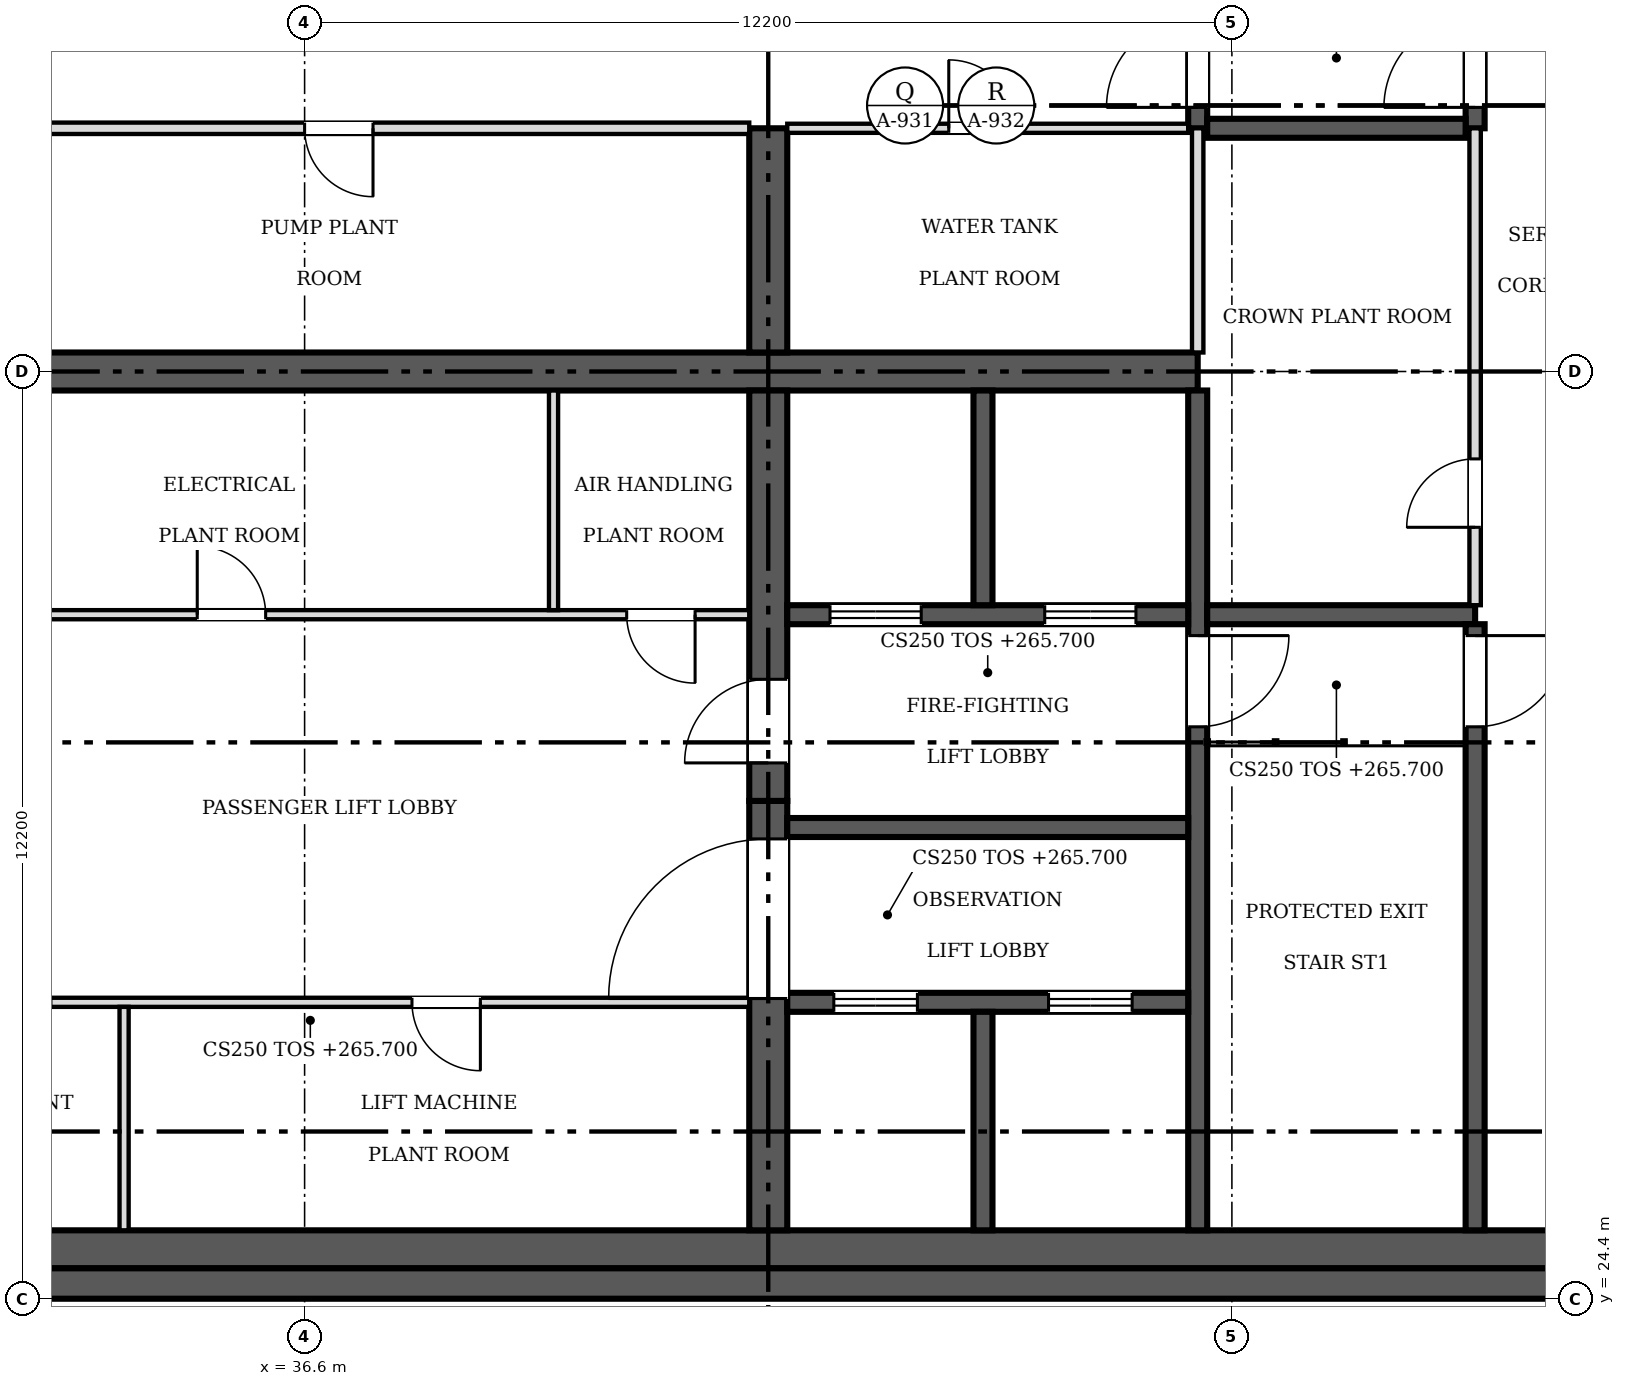
"""IFC4 building model, lengths in metres.
Left out: names, types, materials, properties, quantities, classifications, styles, units other than length and angle.
Written with IfcOpenShell. Run it as: python <this file> out.ifc"""

import sys

from ifc_helpers import new_model, si_unit, direction, frame, frame_2d, origin, place, context, subcontext, project, spatial, rectangle, extrude, source, transform, mapped, element, fill, save


model = new_model("IFC4")
c1 = context("Model", 3, precision=1e-05, world=origin(), true_north=direction((0.0, 1.0)))
c2 = subcontext(c1, "Body", "Model", "MODEL_VIEW")
j1 = project(units=[si_unit("LENGTHUNIT", "METRE"), si_unit("PLANEANGLEUNIT", "RADIAN")], contexts=[c1])
p1 = place(None, origin())
s1 = spatial("IfcSite", under=j1, at=p1, CompositionType="ELEMENT")
p2 = place(p1, origin())
s2 = spatial("IfcBuilding", under=s1, at=p2, CompositionType="ELEMENT")
p3 = place(p2, frame((0.0, 0.0, 265.7)))
s3 = spatial("IfcBuildingStorey", under=s2, at=p3, CompositionType="ELEMENT", Elevation=265.7)
p4 = place(p3, frame((54.9, 24.6, 0.0), z_axis=(0.0, 0.0, 1.0), x_axis=(-1.0, 0.0, 0.0)))
e1 = element("IfcWall", 1, at=p4, inside=s3, PredefinedType="SHEAR", context=c2, shape_type="SweptSolid", body=[
    extrude(rectangle(XDim=24.4, YDim=0.4, at=frame_2d((12.2, 0.0))), origin(), (0.0, 0.0, 1.0), 4.2),
])
p5 = place(p3, frame((30.9, 25.05, 0.0), z_axis=(0.0, 0.0, 1.0), x_axis=(1.0, 0.0, 0.0)))
e2 = element("IfcWall", 2, at=p5, inside=s3, PredefinedType="SOLIDWALL", context=c2, shape_type="SweptSolid", body=[
    extrude(rectangle(XDim=23.6, YDim=0.5, at=frame_2d((11.8, 0.0))), origin(), (0.0, 0.0, 1.0), 4.2),
])
p6 = place(p3, frame((31.4, 36.6, 0.0), z_axis=(0.0, 0.0, 1.0), x_axis=(1.0, 0.0, 0.0)))
e3 = element("IfcWall", 3, at=p6, inside=s3, PredefinedType="SHEAR", context=c2, shape_type="SweptSolid", body=[
    extrude(rectangle(XDim=16.95, YDim=0.5, at=frame_2d((8.475, 0.0))), origin(), (0.0, 0.0, 1.0), 4.2),
])
p7 = place(p3, frame((42.7, 25.3, 0.0), z_axis=(0.0, 0.0, 1.0), x_axis=(0.0, 1.0, 0.0)))
e4 = element("IfcWall", 4, at=p7, inside=s3, PredefinedType="SHEAR", context=c2, shape_type="SweptSolid", body=[
    extrude(rectangle(XDim=5.65, YDim=0.5, at=frame_2d((2.825, 0.0))), origin(), (0.0, 0.0, 1.0), 4.2),
])
m1 = source(origin(), c2, "Body", "SweptSolid", [
    extrude(rectangle(XDim=2.1, YDim=2.4, at=frame_2d((1.05, 1.2))), frame((0.0, 0.26, 0.0), z_axis=(0.0, -1.0, 0.0), x_axis=(1.0, 0.0, 0.0)), (0.0, 0.0, 1.0), 0.52),
])
p8 = place(p7, frame((3.05, 0.0, 0.0)))
e5 = element("IfcOpeningElement", 5, at=p8, cuts=e4, PredefinedType="OPENING", context=c2, shape_type="MappedRepresentation", body=[
    mapped(m1, transform((0.0, 0.0, 0.0), scale=1.0)),
])
p9 = place(p3, frame((42.7, 36.35, 0.0), z_axis=(0.0, 0.0, 1.0), x_axis=(0.0, -1.0, 0.0)))
e6 = element("IfcWall", 6, at=p9, inside=s3, PredefinedType="SHEAR", context=c2, shape_type="SweptSolid", body=[
    extrude(rectangle(XDim=5.4, YDim=0.5, at=frame_2d((2.7, 0.0))), origin(), (0.0, 0.0, 1.0), 4.2),
])
m2 = source(origin(), c2, "Body", "SweptSolid", [
    extrude(rectangle(XDim=1.1, YDim=2.1, at=frame_2d((0.55, 1.05))), frame((0.0, 0.26, 0.0), z_axis=(0.0, -1.0, 0.0), x_axis=(1.0, 0.0, 0.0)), (0.0, 0.0, 1.0), 0.52),
])
p10 = place(p9, frame((3.8, 0.0, 0.0)))
e7 = element("IfcOpeningElement", 7, at=p10, cuts=e6, PredefinedType="OPENING", context=c2, shape_type="MappedRepresentation", body=[
    mapped(m2, transform((0.0, 0.0, 0.0), scale=1.0)),
])
p11 = place(p3, frame((42.7, 36.85, 0.0), z_axis=(0.0, 0.0, 1.0), x_axis=(0.0, 1.0, 0.0)))
e8 = element("IfcWall", 8, at=p11, inside=s3, PredefinedType="SHEAR", context=c2, shape_type="SweptSolid", body=[
    extrude(rectangle(XDim=2.95, YDim=0.5, at=frame_2d((1.475, 0.0))), origin(), (0.0, 0.0, 1.0), 4.2),
])
p12 = place(p3, frame((48.35, 36.35, 0.0), z_axis=(0.0, 0.0, 1.0), x_axis=(0.0, -1.0, 0.0)))
e9 = element("IfcWall", 9, at=p12, inside=s3, PredefinedType="SOLIDWALL", context=c2, shape_type="SweptSolid", body=[
    extrude(rectangle(XDim=11.05, YDim=0.25, at=frame_2d((5.525, 0.0))), origin(), (0.0, 0.0, 1.0), 4.2),
])
m3 = source(origin(), c2, "Body", "SweptSolid", [
    extrude(rectangle(XDim=1.2, YDim=2.1, at=frame_2d((0.6, 1.05))), frame((0.0, 0.135, 0.0), z_axis=(0.0, -1.0, 0.0), x_axis=(1.0, 0.0, 0.0)), (0.0, 0.0, 1.0), 0.27),
])
p13 = place(p12, frame((3.225, 0.0, 0.0)))
e10 = element("IfcOpeningElement", 10, at=p13, cuts=e9, PredefinedType="OPENING", context=c2, shape_type="MappedRepresentation", body=[
    mapped(m3, transform((0.0, 0.0, 0.0), scale=1.0)),
])
p14 = place(p3, frame((48.225, 33.4, 0.0), z_axis=(0.0, 0.0, 1.0), x_axis=(-1.0, 0.0, 0.0)))
e11 = element("IfcWall", 11, at=p14, inside=s3, PredefinedType="SOLIDWALL", context=c2, shape_type="SweptSolid", body=[
    extrude(rectangle(XDim=5.275, YDim=0.25, at=frame_2d((2.638, 0.0))), origin(), (0.0, 0.0, 1.0), 4.2),
])
p15 = place(p14, frame((3.512, 0.0, 0.0)))
e12 = element("IfcOpeningElement", 12, at=p15, cuts=e11, PredefinedType="OPENING", context=c2, shape_type="MappedRepresentation", body=[
    mapped(m3, transform((0.0, 0.0, 0.0), scale=1.0)),
])
p16 = place(p14, frame((0.688, 0.0, 0.0)))
e13 = element("IfcOpeningElement", 13, at=p16, cuts=e11, PredefinedType="OPENING", context=c2, shape_type="MappedRepresentation", body=[
    mapped(m3, transform((0.0, 0.0, 0.0), scale=1.0)),
])
p17 = place(p3, frame((48.475, 33.4, 0.0), z_axis=(0.0, 0.0, 1.0), x_axis=(1.0, 0.0, 0.0)))
e14 = element("IfcWall", 14, at=p17, inside=s3, PredefinedType="SOLIDWALL", context=c2, shape_type="SweptSolid", body=[
    extrude(rectangle(XDim=3.525, YDim=0.25, at=frame_2d((1.762, 0.0))), origin(), (0.0, 0.0, 1.0), 4.2),
])
p18 = place(p3, frame((48.35, 47.9, 0.0), z_axis=(0.0, 0.0, 1.0), x_axis=(0.0, -1.0, 0.0)))
e15 = element("IfcWall", 15, at=p18, inside=s3, PredefinedType="SOLIDWALL", context=c2, shape_type="SweptSolid", body=[
    extrude(rectangle(XDim=8.1, YDim=0.25, at=frame_2d((4.05, 0.0))), origin(), (0.0, 0.0, 1.0), 4.2),
])
p19 = place(p18, frame((6.625, 0.0, 0.0)))
e16 = element("IfcOpeningElement", 16, at=p19, cuts=e15, PredefinedType="OPENING", context=c2, shape_type="MappedRepresentation", body=[
    mapped(m3, transform((0.0, 0.0, 0.0), scale=1.0)),
])
p20 = place(p3, frame((52.0, 25.3, 0.0), z_axis=(0.0, 0.0, 1.0), x_axis=(0.0, 1.0, 0.0)))
e17 = element("IfcWall", 17, at=p20, inside=s3, PredefinedType="SOLIDWALL", context=c2, shape_type="SweptSolid", body=[
    extrude(rectangle(XDim=7.975, YDim=0.25, at=frame_2d((3.987, 0.0))), origin(), (0.0, 0.0, 1.0), 4.2),
])
p21 = place(p20, frame((6.625, 0.0, 0.0)))
e18 = element("IfcOpeningElement", 18, at=p21, cuts=e17, PredefinedType="OPENING", context=c2, shape_type="MappedRepresentation", body=[
    mapped(m3, transform((0.0, 0.0, 0.0), scale=1.0)),
])
p22 = place(p3, frame((52.0, 39.8, 0.0), z_axis=(0.0, 0.0, 1.0), x_axis=(0.0, 1.0, 0.0)))
e19 = element("IfcWall", 19, at=p22, inside=s3, PredefinedType="SOLIDWALL", context=c2, shape_type="SweptSolid", body=[
    extrude(rectangle(XDim=8.1, YDim=0.25, at=frame_2d((4.05, 0.0))), origin(), (0.0, 0.0, 1.0), 4.2),
])
p23 = place(p22, frame((0.275, 0.0, 0.0)))
e20 = element("IfcOpeningElement", 20, at=p23, cuts=e19, PredefinedType="OPENING", context=c2, shape_type="MappedRepresentation", body=[
    mapped(m3, transform((0.0, 0.0, 0.0), scale=1.0)),
])
p24 = place(p3, frame((42.95, 28.3, 0.0), z_axis=(0.0, 0.0, 1.0), x_axis=(1.0, 0.0, 0.0)))
e21 = element("IfcWall", 21, at=p24, inside=s3, PredefinedType="SOLIDWALL", context=c2, shape_type="SweptSolid", body=[
    extrude(rectangle(XDim=5.275, YDim=0.25, at=frame_2d((2.638, 0.0))), origin(), (0.0, 0.0, 1.0), 4.2),
])
m4 = source(origin(), c2, "Body", "SweptSolid", [
    extrude(rectangle(XDim=1.1, YDim=2.1, at=frame_2d((0.55, 1.05))), frame((0.0, 0.135, 0.0), z_axis=(0.0, -1.0, 0.0), x_axis=(1.0, 0.0, 0.0)), (0.0, 0.0, 1.0), 0.27),
])
p25 = place(p24, frame((0.613, 0.0, 0.0)))
e22 = element("IfcOpeningElement", 22, at=p25, cuts=e21, PredefinedType="OPENING", context=c2, shape_type="MappedRepresentation", body=[
    mapped(m4, transform((0.0, 0.0, 0.0), scale=1.0)),
])
p26 = place(p24, frame((3.438, 0.0, 0.0)))
e23 = element("IfcOpeningElement", 23, at=p26, cuts=e21, PredefinedType="OPENING", context=c2, shape_type="MappedRepresentation", body=[
    mapped(m4, transform((0.0, 0.0, 0.0), scale=1.0)),
])
p27 = place(p3, frame((42.95, 30.6, 0.0), z_axis=(0.0, 0.0, 1.0), x_axis=(1.0, 0.0, 0.0)))
e24 = element("IfcWall", 24, at=p27, inside=s3, PredefinedType="SOLIDWALL", context=c2, shape_type="SweptSolid", body=[
    extrude(rectangle(XDim=5.275, YDim=0.25, at=frame_2d((2.638, 0.0))), origin(), (0.0, 0.0, 1.0), 4.2),
])
p28 = place(p3, frame((48.475, 39.8, 0.0), z_axis=(0.0, 0.0, 1.0), x_axis=(1.0, 0.0, 0.0)))
e25 = element("IfcWall", 25, at=p28, inside=s3, PredefinedType="SOLIDWALL", context=c2, shape_type="SweptSolid", body=[
    extrude(rectangle(XDim=3.4, YDim=0.25, at=frame_2d((1.7, 0.0))), origin(), (0.0, 0.0, 1.0), 4.2),
])
p29 = place(p3, frame((45.525, 33.525, 0.0), z_axis=(0.0, 0.0, 1.0), x_axis=(0.0, 1.0, 0.0)))
e26 = element("IfcWall", 26, at=p29, inside=s3, PredefinedType="SOLIDWALL", context=c2, shape_type="SweptSolid", body=[
    extrude(rectangle(XDim=2.825, YDim=0.25, at=frame_2d((1.413, 0.0))), origin(), (0.0, 0.0, 1.0), 4.2),
])
p30 = place(p3, frame((45.525, 25.3, 0.0), z_axis=(0.0, 0.0, 1.0), x_axis=(0.0, 1.0, 0.0)))
e27 = element("IfcWall", 27, at=p30, inside=s3, PredefinedType="SOLIDWALL", context=c2, shape_type="SweptSolid", body=[
    extrude(rectangle(XDim=2.875, YDim=0.25, at=frame_2d((1.438, 0.0))), origin(), (0.0, 0.0, 1.0), 4.2),
])
p31 = place(p3, frame((42.45, 28.3, 0.0), z_axis=(0.0, 0.0, 1.0), x_axis=(-1.0, 0.0, 0.0)))
e28 = element("IfcWall", 28, at=p31, inside=s3, PredefinedType="PARTITIONING", context=c2, shape_type="SweptSolid", body=[
    extrude(rectangle(XDim=11.05, YDim=0.12, at=frame_2d((5.525, 0.0))), origin(), (0.0, 0.0, 1.0), 4.2),
])
m5 = source(origin(), c2, "Body", "SweptSolid", [
    extrude(rectangle(XDim=0.9, YDim=2.1, at=frame_2d((0.45, 1.05))), frame((0.0, 0.07, 0.0), z_axis=(0.0, -1.0, 0.0), x_axis=(1.0, 0.0, 0.0)), (0.0, 0.0, 1.0), 0.14),
])
p32 = place(p31, frame((9.188, 0.0, 0.0)))
e29 = element("IfcOpeningElement", 29, at=p32, cuts=e28, PredefinedType="OPENING", context=c2, shape_type="MappedRepresentation", body=[
    mapped(m5, transform((0.0, 0.0, 0.0), scale=1.0)),
])
p33 = place(p31, frame((3.538, 0.0, 0.0)))
e30 = element("IfcOpeningElement", 30, at=p33, cuts=e28, PredefinedType="OPENING", context=c2, shape_type="MappedRepresentation", body=[
    mapped(m5, transform((0.0, 0.0, 0.0), scale=1.0)),
])
p34 = place(p3, frame((31.4, 33.4, 0.0), z_axis=(0.0, 0.0, 1.0), x_axis=(1.0, 0.0, 0.0)))
e31 = element("IfcWall", 31, at=p34, inside=s3, PredefinedType="PARTITIONING", context=c2, shape_type="SweptSolid", body=[
    extrude(rectangle(XDim=11.05, YDim=0.12, at=frame_2d((5.525, 0.0))), origin(), (0.0, 0.0, 1.0), 4.2),
])
p35 = place(p34, frame((3.788, 0.0, 0.0)))
e32 = element("IfcOpeningElement", 32, at=p35, cuts=e31, PredefinedType="OPENING", context=c2, shape_type="MappedRepresentation", body=[
    mapped(m5, transform((0.0, 0.0, 0.0), scale=1.0)),
])
p36 = place(p34, frame((9.438, 0.0, 0.0)))
e33 = element("IfcOpeningElement", 33, at=p36, cuts=e31, PredefinedType="OPENING", context=c2, shape_type="MappedRepresentation", body=[
    mapped(m5, transform((0.0, 0.0, 0.0), scale=1.0)),
])
p37 = place(p3, frame((42.45, 39.8, 0.0), z_axis=(0.0, 0.0, 1.0), x_axis=(-1.0, 0.0, 0.0)))
e34 = element("IfcWall", 34, at=p37, inside=s3, PredefinedType="PARTITIONING", context=c2, shape_type="SweptSolid", body=[
    extrude(rectangle(XDim=11.05, YDim=0.15, at=frame_2d((5.525, 0.0))), origin(), (0.0, 0.0, 1.0), 4.2),
])
m6 = source(origin(), c2, "Body", "SweptSolid", [
    extrude(rectangle(XDim=0.9, YDim=2.1, at=frame_2d((0.45, 1.05))), frame((0.0, 0.085, 0.0), z_axis=(0.0, -1.0, 0.0), x_axis=(1.0, 0.0, 0.0)), (0.0, 0.0, 1.0), 0.17),
])
p38 = place(p37, frame((4.95, 0.0, 0.0)))
e35 = element("IfcOpeningElement", 35, at=p38, cuts=e34, PredefinedType="OPENING", context=c2, shape_type="MappedRepresentation", body=[
    mapped(m6, transform((0.0, 0.0, 0.0), scale=1.0)),
])
p39 = place(p3, frame((52.0, 33.525, 0.0), z_axis=(0.0, 0.0, 1.0), x_axis=(0.0, 1.0, 0.0)))
e36 = element("IfcWall", 36, at=p39, inside=s3, PredefinedType="PARTITIONING", context=c2, shape_type="SweptSolid", body=[
    extrude(rectangle(XDim=6.275, YDim=0.15, at=frame_2d((3.138, 0.0))), origin(), (0.0, 0.0, 1.0), 4.2),
])
p40 = place(p39, frame((1.025, 0.0, 0.0)))
e37 = element("IfcOpeningElement", 37, at=p40, cuts=e36, PredefinedType="OPENING", context=c2, shape_type="MappedRepresentation", body=[
    mapped(m6, transform((0.0, 0.0, 0.0), scale=1.0)),
])
p41 = place(p3, frame((48.225, 39.8, 0.0), z_axis=(0.0, 0.0, 1.0), x_axis=(-1.0, 0.0, 0.0)))
e38 = element("IfcWall", 38, at=p41, inside=s3, PredefinedType="PARTITIONING", context=c2, shape_type="SweptSolid", body=[
    extrude(rectangle(XDim=5.275, YDim=0.12, at=frame_2d((2.638, 0.0))), origin(), (0.0, 0.0, 1.0), 4.2),
])
p42 = place(p41, frame((2.25, 0.0, 0.0)))
e39 = element("IfcOpeningElement", 39, at=p42, cuts=e38, PredefinedType="OPENING", context=c2, shape_type="MappedRepresentation", body=[
    mapped(m5, transform((0.0, 0.0, 0.0), scale=1.0)),
])
p43 = place(p3, frame((48.35, 36.85, 0.0), z_axis=(0.0, 0.0, 1.0), x_axis=(0.0, 1.0, 0.0)))
e40 = element("IfcWall", 40, at=p43, inside=s3, PredefinedType="PARTITIONING", context=c2, shape_type="SweptSolid", body=[
    extrude(rectangle(XDim=2.95, YDim=0.15, at=frame_2d((1.475, 0.0))), origin(), (0.0, 0.0, 1.0), 4.2),
])
p44 = place(p3, frame((39.875, 33.46, 0.0), z_axis=(0.0, 0.0, 1.0), x_axis=(0.0, 1.0, 0.0)))
e41 = element("IfcWall", 41, at=p44, inside=s3, PredefinedType="PARTITIONING", context=c2, shape_type="SweptSolid", body=[
    extrude(rectangle(XDim=2.89, YDim=0.12, at=frame_2d((1.445, 0.0))), origin(), (0.0, 0.0, 1.0), 4.2),
])
p45 = place(p3, frame((34.225, 25.3, 0.0), z_axis=(0.0, 0.0, 1.0), x_axis=(0.0, 1.0, 0.0)))
e42 = element("IfcWall", 42, at=p45, inside=s3, PredefinedType="PARTITIONING", context=c2, shape_type="SweptSolid", body=[
    extrude(rectangle(XDim=2.94, YDim=0.12, at=frame_2d((1.47, 0.0))), origin(), (0.0, 0.0, 1.0), 4.2),
])
m7 = source(origin(), c2, "Body", "SweptSolid", [
    extrude(rectangle(XDim=2.1, YDim=2.4, at=frame_2d((1.05, 1.2))), frame((0.0, 0.025, 0.0), z_axis=(0.0, -1.0, 0.0), x_axis=(1.0, 0.0, 0.0)), (0.0, 0.0, 1.0), 0.05),
])
p46 = place(p8, origin())
e43 = element("IfcDoor", 43, at=p46, inside=s3, OperationType="DOUBLE_DOOR_SINGLE_SWING", PredefinedType="DOOR", context=c2, shape_type="MappedRepresentation", body=[
    mapped(m7, transform((0.0, 0.0, 0.0), scale=1.0)),
])
fill(e5, e43)
m8 = source(origin(), c2, "Body", "SweptSolid", [
    extrude(rectangle(XDim=1.1, YDim=2.1, at=frame_2d((0.55, 1.05))), frame((0.0, 0.025, 0.0), z_axis=(0.0, -1.0, 0.0), x_axis=(1.0, 0.0, 0.0)), (0.0, 0.0, 1.0), 0.05),
])
p47 = place(p10, origin())
e44 = element("IfcDoor", 44, at=p47, inside=s3, OperationType="SINGLE_SWING_RIGHT", PredefinedType="DOOR", context=c2, shape_type="MappedRepresentation", body=[
    mapped(m8, transform((0.0, 0.0, 0.0), scale=1.0)),
])
fill(e7, e44)
m9 = source(origin(), c2, "Body", "SweptSolid", [
    extrude(rectangle(XDim=1.2, YDim=2.1, at=frame_2d((0.6, 1.05))), frame((0.0, 0.025, 0.0), z_axis=(0.0, -1.0, 0.0), x_axis=(1.0, 0.0, 0.0)), (0.0, 0.0, 1.0), 0.05),
])
p48 = place(p13, origin())
e45 = element("IfcDoor", 45, at=p48, inside=s3, OperationType="SINGLE_SWING_LEFT", PredefinedType="DOOR", context=c2, shape_type="MappedRepresentation", body=[
    mapped(m9, transform((0.0, 0.0, 0.0), scale=1.0)),
])
fill(e10, e45)
p49 = place(p15, origin())
e46 = element("IfcDoor", 46, at=p49, inside=s3, OperationType="DOUBLE_DOOR_SLIDING", PredefinedType="DOOR", context=c2, shape_type="MappedRepresentation", body=[
    mapped(m9, transform((0.0, 0.0, 0.0), scale=1.0)),
])
fill(e12, e46)
p50 = place(p16, origin())
e47 = element("IfcDoor", 47, at=p50, inside=s3, OperationType="DOUBLE_DOOR_SLIDING", PredefinedType="DOOR", context=c2, shape_type="MappedRepresentation", body=[
    mapped(m9, transform((0.0, 0.0, 0.0), scale=1.0)),
])
fill(e13, e47)
p51 = place(p19, origin())
e48 = element("IfcDoor", 48, at=p51, inside=s3, OperationType="SINGLE_SWING_RIGHT", PredefinedType="DOOR", context=c2, shape_type="MappedRepresentation", body=[
    mapped(m9, transform((0.0, 0.0, 0.0), scale=1.0)),
])
fill(e16, e48)
p52 = place(p21, origin())
e49 = element("IfcDoor", 49, at=p52, inside=s3, OperationType="SINGLE_SWING_RIGHT", PredefinedType="DOOR", context=c2, shape_type="MappedRepresentation", body=[
    mapped(m9, transform((0.0, 0.0, 0.0), scale=1.0)),
])
fill(e18, e49)
p53 = place(p23, origin())
e50 = element("IfcDoor", 50, at=p53, inside=s3, OperationType="SINGLE_SWING_LEFT", PredefinedType="DOOR", context=c2, shape_type="MappedRepresentation", body=[
    mapped(m9, transform((0.0, 0.0, 0.0), scale=1.0)),
])
fill(e20, e50)
p54 = place(p25, origin())
e51 = element("IfcDoor", 51, at=p54, inside=s3, OperationType="DOUBLE_DOOR_SLIDING", PredefinedType="DOOR", context=c2, shape_type="MappedRepresentation", body=[
    mapped(m8, transform((0.0, 0.0, 0.0), scale=1.0)),
])
fill(e22, e51)
p55 = place(p26, origin())
e52 = element("IfcDoor", 52, at=p55, inside=s3, OperationType="DOUBLE_DOOR_SLIDING", PredefinedType="DOOR", context=c2, shape_type="MappedRepresentation", body=[
    mapped(m8, transform((0.0, 0.0, 0.0), scale=1.0)),
])
fill(e23, e52)
m10 = source(origin(), c2, "Body", "SweptSolid", [
    extrude(rectangle(XDim=0.9, YDim=2.1, at=frame_2d((0.45, 1.05))), frame((0.0, 0.025, 0.0), z_axis=(0.0, -1.0, 0.0), x_axis=(1.0, 0.0, 0.0)), (0.0, 0.0, 1.0), 0.05),
])
p56 = place(p33, origin())
e53 = element("IfcDoor", 53, at=p56, inside=s3, OperationType="SINGLE_SWING_LEFT", PredefinedType="DOOR", context=c2, shape_type="MappedRepresentation", body=[
    mapped(m10, transform((0.0, 0.0, 0.0), scale=1.0)),
])
fill(e30, e53)
p57 = place(p35, origin())
e54 = element("IfcDoor", 54, at=p57, inside=s3, OperationType="SINGLE_SWING_LEFT", PredefinedType="DOOR", context=c2, shape_type="MappedRepresentation", body=[
    mapped(m10, transform((0.0, 0.0, 0.0), scale=1.0)),
])
fill(e32, e54)
p58 = place(p36, origin())
e55 = element("IfcDoor", 55, at=p58, inside=s3, OperationType="SINGLE_SWING_RIGHT", PredefinedType="DOOR", context=c2, shape_type="MappedRepresentation", body=[
    mapped(m10, transform((0.0, 0.0, 0.0), scale=1.0)),
])
fill(e33, e55)
p59 = place(p38, origin())
e56 = element("IfcDoor", 56, at=p59, inside=s3, OperationType="SINGLE_SWING_LEFT", PredefinedType="DOOR", context=c2, shape_type="MappedRepresentation", body=[
    mapped(m10, transform((0.0, 0.0, 0.0), scale=1.0)),
])
fill(e35, e56)
p60 = place(p40, origin())
e57 = element("IfcDoor", 57, at=p60, inside=s3, OperationType="SINGLE_SWING_LEFT", PredefinedType="DOOR", context=c2, shape_type="MappedRepresentation", body=[
    mapped(m10, transform((0.0, 0.0, 0.0), scale=1.0)),
])
fill(e37, e57)
p61 = place(p42, origin())
e58 = element("IfcDoor", 58, at=p61, inside=s3, OperationType="SINGLE_SWING_RIGHT", PredefinedType="DOOR", context=c2, shape_type="MappedRepresentation", body=[
    mapped(m10, transform((0.0, 0.0, 0.0), scale=1.0)),
])
fill(e39, e58)
save(model, sys.argv[1])
